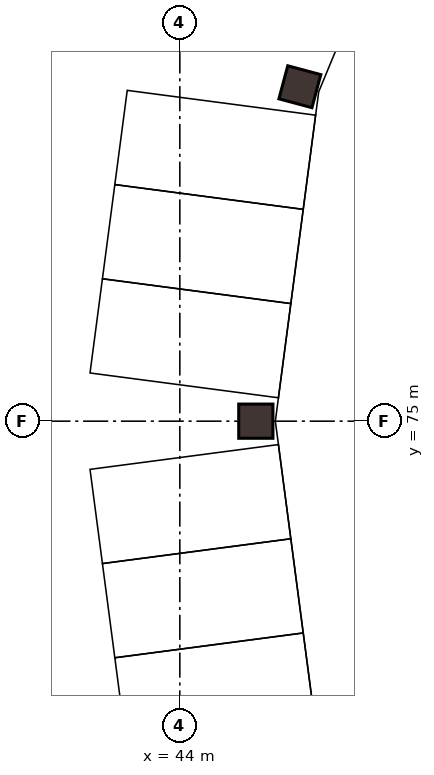
"""IFC4 building model, lengths in metres.
Left out: names, types, materials, properties, quantities, classifications, styles, units other than length and angle.
Written with IfcOpenShell. Run it as: python <this file> out.ifc"""

import sys

from ifc_helpers import new_model, si_unit, direction, frame, origin, origin_2d, place, context, subcontext, project, spatial, rectangle, extrude, element, save


model = new_model("IFC4")
c1 = context("Model", 3, precision=1e-05, world=origin(), true_north=direction((0.0, 1.0)))
c2 = subcontext(c1, "Body", "Model", "MODEL_VIEW")
j1 = project(units=[si_unit("LENGTHUNIT", "METRE"), si_unit("PLANEANGLEUNIT", "RADIAN")], contexts=[c1])
p1 = place(None, origin())
s1 = spatial("IfcSite", under=j1, at=p1, CompositionType="ELEMENT")
p2 = place(p1, origin())
s2 = spatial("IfcBuilding", under=s1, at=p2, CompositionType="ELEMENT")
p3 = place(p2, frame((0.0, 0.0, -9.0)))
s3 = spatial("IfcBuildingStorey", under=s2, at=p3, CompositionType="ELEMENT", Elevation=-9.0)
for number, where, z_axis, x_axis in (
    (1, (47.158, 83.8, 0.0), (0.0, 0.0, 1.0), (-0.966, 0.259, 0.0)),
    (2, (46.0, 75.0, 0.0), (0.0, 0.0, 1.0), (-1.0, 0.0, 0.0)),
):
    element("IfcColumn", number, at=place(p3, frame(where, z_axis=z_axis, x_axis=x_axis)), inside=s3, PredefinedType="COLUMN", context=c2, shape_type="SweptSolid", body=[
        extrude(rectangle(XDim=0.9, YDim=0.9, at=origin_2d()), origin(), (0.0, 0.0, 1.0), 4.5),
    ])
save(model, sys.argv[1])
